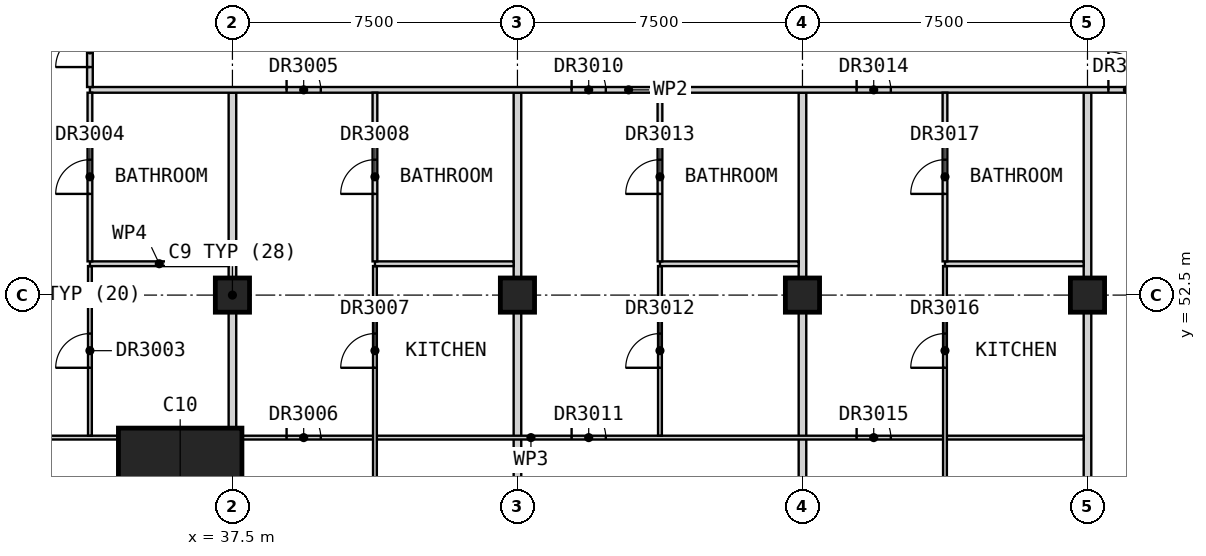
"""IFC4 building model, lengths in metres.
Left out: names, types, materials, properties, quantities, classifications, styles, units other than length and angle.
Written with IfcOpenShell. Run it as: python <this file> out.ifc"""

import sys

from ifc_helpers import new_model, si_unit, direction, frame, frame_2d, origin, origin_2d, place, context, subcontext, project, spatial, rectangle, extrude, element, fill, save


model = new_model("IFC4")
c1 = context("Model", 3, precision=1e-05, world=origin(), true_north=direction((0.0, 1.0)))
c2 = subcontext(c1, "Body", "Model", "MODEL_VIEW")
j1 = project(units=[si_unit("LENGTHUNIT", "METRE"), si_unit("PLANEANGLEUNIT", "RADIAN")], contexts=[c1])
p1 = place(None, origin())
s1 = spatial("IfcSite", under=j1, at=p1, CompositionType="ELEMENT")
p2 = place(p1, origin())
s2 = spatial("IfcBuilding", under=s1, at=p2, CompositionType="ELEMENT")
p3 = place(p2, frame((0.0, 0.0, 186.2)))
s3 = spatial("IfcBuildingStorey", under=s2, at=p3, CompositionType="ELEMENT", Elevation=186.2)
for number, where, z_axis, x_axis in (
    (1, (37.5, 52.5, 0.0), (0.0, 0.0, 1.0), (1.0, 0.0, 0.0)),
    (2, (45.0, 52.5, 0.0), (0.0, 0.0, 1.0), (1.0, 0.0, 0.0)),
    (3, (52.5, 52.5, 0.0), (0.0, 0.0, 1.0), (1.0, 0.0, 0.0)),
    (4, (60.0, 52.5, 0.0), (0.0, 0.0, 1.0), (1.0, 0.0, 0.0)),
):
    element("IfcColumn", number, at=place(p3, frame(where, z_axis=z_axis, x_axis=x_axis)), inside=s3, PredefinedType="COLUMN", context=c2, shape_type="SweptSolid", body=[
        extrude(rectangle(XDim=0.9, YDim=0.9, at=origin_2d()), origin(), (0.0, 0.0, 1.0), 3.5),
    ])
p4 = place(p3, frame((36.125, 47.375, 0.0), z_axis=(0.0, 0.0, 1.0), x_axis=(1.0, 0.0, 0.0)))
e5 = element("IfcColumn", 5, at=p4, inside=s3, PredefinedType="COLUMN", context=c2, shape_type="SweptSolid", body=[
    extrude(rectangle(XDim=3.25, YDim=3.25, at=origin_2d()), origin(), (0.0, 0.0, 1.0), 3.5),
])
p5 = place(p3, frame((37.5, 41.25, 0.0), z_axis=(0.0, 0.0, 1.0), x_axis=(0.0, 1.0, 0.0)))
e6 = element("IfcWall", 6, at=p5, inside=s3, PredefinedType="PARTITIONING", context=c2, shape_type="SweptSolid", body=[
    extrude(rectangle(XDim=16.575, YDim=0.2, at=frame_2d((8.288, 0.0))), origin(), (0.0, 0.0, 1.0), 2.75),
])
for number, where, z_axis, x_axis in (
    (7, (45.0, 41.25, 0.0), (0.0, 0.0, 1.0), (0.0, 1.0, 0.0)),
    (8, (52.5, 41.25, 0.0), (0.0, 0.0, 1.0), (0.0, 1.0, 0.0)),
    (9, (60.0, 41.25, 0.0), (0.0, 0.0, 1.0), (0.0, 1.0, 0.0)),
):
    element("IfcWall", number, at=place(p3, frame(where, z_axis=z_axis, x_axis=x_axis)), inside=s3, PredefinedType="PARTITIONING", context=c2, shape_type="SweptSolid", body=[
        extrude(rectangle(XDim=16.575, YDim=0.2, at=frame_2d((8.288, 0.0))), origin(), (0.0, 0.0, 1.0), 3.25),
    ])
p6 = place(p3, frame((33.75, 57.9, 0.0), z_axis=(0.0, 0.0, 1.0), x_axis=(1.0, 0.0, 0.0)))
e10 = element("IfcWall", 10, at=p6, inside=s3, PredefinedType="PARTITIONING", context=c2, shape_type="SweptSolid", body=[
    extrude(rectangle(XDim=28.35, YDim=0.15, at=frame_2d((14.175, 0.0))), origin(), (0.0, 0.0, 1.0), 3.25),
])
p7 = place(p6, frame((5.175, 0.0, 0.0)))
e11 = element("IfcOpeningElement", 11, at=p7, cuts=e10, PredefinedType="OPENING", context=c2, shape_type="SweptSolid", body=[
    extrude(rectangle(XDim=0.9, YDim=2.1, at=frame_2d((0.45, 1.05))), frame((0.0, 0.085, 0.0), z_axis=(0.0, -1.0, 0.0), x_axis=(1.0, 0.0, 0.0)), (0.0, 0.0, 1.0), 0.17),
])
p8 = place(p6, frame((12.675, 0.0, 0.0)))
e12 = element("IfcOpeningElement", 12, at=p8, cuts=e10, PredefinedType="OPENING", context=c2, shape_type="SweptSolid", body=[
    extrude(rectangle(XDim=0.9, YDim=2.1, at=frame_2d((0.45, 1.05))), frame((0.0, 0.085, 0.0), z_axis=(0.0, -1.0, 0.0), x_axis=(1.0, 0.0, 0.0)), (0.0, 0.0, 1.0), 0.17),
])
p9 = place(p6, frame((20.175, 0.0, 0.0)))
e13 = element("IfcOpeningElement", 13, at=p9, cuts=e10, PredefinedType="OPENING", context=c2, shape_type="SweptSolid", body=[
    extrude(rectangle(XDim=0.9, YDim=2.1, at=frame_2d((0.45, 1.05))), frame((0.0, 0.085, 0.0), z_axis=(0.0, -1.0, 0.0), x_axis=(1.0, 0.0, 0.0)), (0.0, 0.0, 1.0), 0.17),
])
p10 = place(p6, frame((26.8, 0.0, 0.0)))
e14 = element("IfcOpeningElement", 14, at=p10, cuts=e10, PredefinedType="OPENING", context=c2, shape_type="SweptSolid", body=[
    extrude(rectangle(XDim=1.0, YDim=2.1, at=frame_2d((0.5, 1.05))), frame((0.0, 0.085, 0.0), z_axis=(0.0, -1.0, 0.0), x_axis=(1.0, 0.0, 0.0)), (0.0, 0.0, 1.0), 0.17),
])
p11 = place(p3, frame((33.75, 57.975, 0.0), z_axis=(0.0, 0.0, 1.0), x_axis=(0.0, 1.0, 0.0)))
e15 = element("IfcWall", 15, at=p11, inside=s3, PredefinedType="PARTITIONING", context=c2, shape_type="SweptSolid", body=[
    extrude(rectangle(XDim=2.025, YDim=0.15, at=frame_2d((1.012, 0.0))), origin(), (0.0, 0.0, 1.0), 3.25),
])
p12 = place(p11, frame((0.525, 0.0, 0.0)))
e16 = element("IfcOpeningElement", 16, at=p12, cuts=e15, PredefinedType="OPENING", context=c2, shape_type="SweptSolid", body=[
    extrude(rectangle(XDim=0.9, YDim=2.1, at=frame_2d((0.45, 1.05))), frame((0.0, 0.085, 0.0), z_axis=(0.0, -1.0, 0.0), x_axis=(1.0, 0.0, 0.0)), (0.0, 0.0, 1.0), 0.17),
])
p13 = place(p3, frame((30.81, 48.75, 0.0), z_axis=(0.0, 0.0, 1.0), x_axis=(1.0, 0.0, 0.0)))
e17 = element("IfcWall", 17, at=p13, inside=s3, PredefinedType="PARTITIONING", context=c2, shape_type="SweptSolid", body=[
    extrude(rectangle(XDim=29.09, YDim=0.1, at=frame_2d((14.545, 0.0))), origin(), (0.0, 0.0, 1.0), 3.25),
])
p14 = place(p13, frame((0.615, 0.0, 0.0)))
e18 = element("IfcOpeningElement", 18, at=p14, cuts=e17, PredefinedType="OPENING", context=c2, shape_type="SweptSolid", body=[
    extrude(rectangle(XDim=0.9, YDim=2.1, at=frame_2d((0.45, 1.05))), frame((0.0, 0.06, 0.0), z_axis=(0.0, -1.0, 0.0), x_axis=(1.0, 0.0, 0.0)), (0.0, 0.0, 1.0), 0.12),
])
p15 = place(p13, frame((8.115, 0.0, 0.0)))
e19 = element("IfcOpeningElement", 19, at=p15, cuts=e17, PredefinedType="OPENING", context=c2, shape_type="SweptSolid", body=[
    extrude(rectangle(XDim=0.9, YDim=2.1, at=frame_2d((0.45, 1.05))), frame((0.0, 0.06, 0.0), z_axis=(0.0, -1.0, 0.0), x_axis=(1.0, 0.0, 0.0)), (0.0, 0.0, 1.0), 0.12),
])
p16 = place(p13, frame((15.615, 0.0, 0.0)))
e20 = element("IfcOpeningElement", 20, at=p16, cuts=e17, PredefinedType="OPENING", context=c2, shape_type="SweptSolid", body=[
    extrude(rectangle(XDim=0.9, YDim=2.1, at=frame_2d((0.45, 1.05))), frame((0.0, 0.06, 0.0), z_axis=(0.0, -1.0, 0.0), x_axis=(1.0, 0.0, 0.0)), (0.0, 0.0, 1.0), 0.12),
])
p17 = place(p13, frame((23.115, 0.0, 0.0)))
e21 = element("IfcOpeningElement", 21, at=p17, cuts=e17, PredefinedType="OPENING", context=c2, shape_type="SweptSolid", body=[
    extrude(rectangle(XDim=0.9, YDim=2.1, at=frame_2d((0.45, 1.05))), frame((0.0, 0.06, 0.0), z_axis=(0.0, -1.0, 0.0), x_axis=(1.0, 0.0, 0.0)), (0.0, 0.0, 1.0), 0.12),
])
p18 = place(p3, frame((33.75, 48.8, 0.0), z_axis=(0.0, 0.0, 1.0), x_axis=(0.0, 1.0, 0.0)))
e22 = element("IfcWall", 22, at=p18, inside=s3, PredefinedType="PARTITIONING", context=c2, shape_type="SweptSolid", body=[
    extrude(rectangle(XDim=4.462, YDim=0.1, at=frame_2d((2.231, 0.0))), origin(), (0.0, 0.0, 1.0), 3.25),
])
p19 = place(p18, frame((1.788, 0.0, 0.0)))
e23 = element("IfcOpeningElement", 23, at=p19, cuts=e22, PredefinedType="OPENING", context=c2, shape_type="SweptSolid", body=[
    extrude(rectangle(XDim=0.9, YDim=2.1, at=frame_2d((0.45, 1.05))), frame((0.0, 0.06, 0.0), z_axis=(0.0, -1.0, 0.0), x_axis=(1.0, 0.0, 0.0)), (0.0, 0.0, 1.0), 0.12),
])
p20 = place(p3, frame((41.25, 42.06, 0.0), z_axis=(0.0, 0.0, 1.0), x_axis=(0.0, 1.0, 0.0)))
e24 = element("IfcWall", 24, at=p20, inside=s3, PredefinedType="PARTITIONING", context=c2, shape_type="SweptSolid", body=[
    extrude(rectangle(XDim=11.202, YDim=0.1, at=frame_2d((5.601, 0.0))), origin(), (0.0, 0.0, 1.0), 3.25),
])
p21 = place(p20, frame((8.528, 0.0, 0.0)))
e25 = element("IfcOpeningElement", 25, at=p21, cuts=e24, PredefinedType="OPENING", context=c2, shape_type="SweptSolid", body=[
    extrude(rectangle(XDim=0.9, YDim=2.1, at=frame_2d((0.45, 1.05))), frame((0.0, 0.06, 0.0), z_axis=(0.0, -1.0, 0.0), x_axis=(1.0, 0.0, 0.0)), (0.0, 0.0, 1.0), 0.12),
])
p22 = place(p20, frame((2.49, 0.0, 0.0)))
e26 = element("IfcOpeningElement", 26, at=p22, cuts=e24, PredefinedType="OPENING", context=c2, shape_type="SweptSolid", body=[
    extrude(rectangle(XDim=0.9, YDim=2.1, at=frame_2d((0.45, 1.05))), frame((0.0, 0.06, 0.0), z_axis=(0.0, -1.0, 0.0), x_axis=(1.0, 0.0, 0.0)), (0.0, 0.0, 1.0), 0.12),
])
p23 = place(p3, frame((48.75, 48.8, 0.0), z_axis=(0.0, 0.0, 1.0), x_axis=(0.0, 1.0, 0.0)))
e27 = element("IfcWall", 27, at=p23, inside=s3, PredefinedType="PARTITIONING", context=c2, shape_type="SweptSolid", body=[
    extrude(rectangle(XDim=4.462, YDim=0.1, at=frame_2d((2.231, 0.0))), origin(), (0.0, 0.0, 1.0), 3.25),
])
p24 = place(p23, frame((1.788, 0.0, 0.0)))
e28 = element("IfcOpeningElement", 28, at=p24, cuts=e27, PredefinedType="OPENING", context=c2, shape_type="SweptSolid", body=[
    extrude(rectangle(XDim=0.9, YDim=2.1, at=frame_2d((0.45, 1.05))), frame((0.0, 0.06, 0.0), z_axis=(0.0, -1.0, 0.0), x_axis=(1.0, 0.0, 0.0)), (0.0, 0.0, 1.0), 0.12),
])
p25 = place(p3, frame((56.25, 42.06, 0.0), z_axis=(0.0, 0.0, 1.0), x_axis=(0.0, 1.0, 0.0)))
e29 = element("IfcWall", 29, at=p25, inside=s3, PredefinedType="PARTITIONING", context=c2, shape_type="SweptSolid", body=[
    extrude(rectangle(XDim=11.202, YDim=0.1, at=frame_2d((5.601, 0.0))), origin(), (0.0, 0.0, 1.0), 3.25),
])
p26 = place(p25, frame((8.528, 0.0, 0.0)))
e30 = element("IfcOpeningElement", 30, at=p26, cuts=e29, PredefinedType="OPENING", context=c2, shape_type="SweptSolid", body=[
    extrude(rectangle(XDim=0.9, YDim=2.1, at=frame_2d((0.45, 1.05))), frame((0.0, 0.06, 0.0), z_axis=(0.0, -1.0, 0.0), x_axis=(1.0, 0.0, 0.0)), (0.0, 0.0, 1.0), 0.12),
])
p27 = place(p25, frame((2.49, 0.0, 0.0)))
e31 = element("IfcOpeningElement", 31, at=p27, cuts=e29, PredefinedType="OPENING", context=c2, shape_type="SweptSolid", body=[
    extrude(rectangle(XDim=0.9, YDim=2.1, at=frame_2d((0.45, 1.05))), frame((0.0, 0.06, 0.0), z_axis=(0.0, -1.0, 0.0), x_axis=(1.0, 0.0, 0.0)), (0.0, 0.0, 1.0), 0.12),
])
for number, where, z_axis, x_axis in (
    (32, (33.75, 53.325, 0.0), (0.0, 0.0, 1.0), (1.0, 0.0, 0.0)),
    (33, (41.25, 53.325, 0.0), (0.0, 0.0, 1.0), (1.0, 0.0, 0.0)),
    (34, (48.75, 53.325, 0.0), (0.0, 0.0, 1.0), (1.0, 0.0, 0.0)),
    (35, (56.25, 53.325, 0.0), (0.0, 0.0, 1.0), (1.0, 0.0, 0.0)),
):
    element("IfcWall", number, at=place(p3, frame(where, z_axis=z_axis, x_axis=x_axis)), inside=s3, PredefinedType="PARTITIONING", context=c2, shape_type="SweptSolid", body=[
        extrude(rectangle(XDim=3.65, YDim=0.125, at=frame_2d((1.825, 0.0))), origin(), (0.0, 0.0, 1.0), 3.25),
    ])
p28 = place(p3, frame((33.75, 53.387, 0.0), z_axis=(0.0, 0.0, 1.0), x_axis=(0.0, 1.0, 0.0)))
e36 = element("IfcWall", 36, at=p28, inside=s3, PredefinedType="PARTITIONING", context=c2, shape_type="SweptSolid", body=[
    extrude(rectangle(XDim=4.438, YDim=0.125, at=frame_2d((2.219, 0.0))), origin(), (0.0, 0.0, 1.0), 3.25),
])
p29 = place(p28, frame((1.775, 0.0, 0.0)))
e37 = element("IfcOpeningElement", 37, at=p29, cuts=e36, PredefinedType="OPENING", context=c2, shape_type="SweptSolid", body=[
    extrude(rectangle(XDim=0.9, YDim=2.1, at=frame_2d((0.45, 1.05))), frame((0.0, 0.073, 0.0), z_axis=(0.0, -1.0, 0.0), x_axis=(1.0, 0.0, 0.0)), (0.0, 0.0, 1.0), 0.145),
])
p30 = place(p3, frame((41.25, 53.387, 0.0), z_axis=(0.0, 0.0, 1.0), x_axis=(0.0, 1.0, 0.0)))
e38 = element("IfcWall", 38, at=p30, inside=s3, PredefinedType="PARTITIONING", context=c2, shape_type="SweptSolid", body=[
    extrude(rectangle(XDim=4.438, YDim=0.125, at=frame_2d((2.219, 0.0))), origin(), (0.0, 0.0, 1.0), 3.25),
])
p31 = place(p30, frame((1.775, 0.0, 0.0)))
e39 = element("IfcOpeningElement", 39, at=p31, cuts=e38, PredefinedType="OPENING", context=c2, shape_type="SweptSolid", body=[
    extrude(rectangle(XDim=0.9, YDim=2.1, at=frame_2d((0.45, 1.05))), frame((0.0, 0.073, 0.0), z_axis=(0.0, -1.0, 0.0), x_axis=(1.0, 0.0, 0.0)), (0.0, 0.0, 1.0), 0.145),
])
p32 = place(p3, frame((48.75, 53.387, 0.0), z_axis=(0.0, 0.0, 1.0), x_axis=(0.0, 1.0, 0.0)))
e40 = element("IfcWall", 40, at=p32, inside=s3, PredefinedType="PARTITIONING", context=c2, shape_type="SweptSolid", body=[
    extrude(rectangle(XDim=4.438, YDim=0.125, at=frame_2d((2.219, 0.0))), origin(), (0.0, 0.0, 1.0), 3.25),
])
p33 = place(p32, frame((1.775, 0.0, 0.0)))
e41 = element("IfcOpeningElement", 41, at=p33, cuts=e40, PredefinedType="OPENING", context=c2, shape_type="SweptSolid", body=[
    extrude(rectangle(XDim=0.9, YDim=2.1, at=frame_2d((0.45, 1.05))), frame((0.0, 0.073, 0.0), z_axis=(0.0, -1.0, 0.0), x_axis=(1.0, 0.0, 0.0)), (0.0, 0.0, 1.0), 0.145),
])
p34 = place(p3, frame((56.25, 53.387, 0.0), z_axis=(0.0, 0.0, 1.0), x_axis=(0.0, 1.0, 0.0)))
e42 = element("IfcWall", 42, at=p34, inside=s3, PredefinedType="PARTITIONING", context=c2, shape_type="SweptSolid", body=[
    extrude(rectangle(XDim=4.438, YDim=0.125, at=frame_2d((2.219, 0.0))), origin(), (0.0, 0.0, 1.0), 3.25),
])
p35 = place(p34, frame((1.775, 0.0, 0.0)))
e43 = element("IfcOpeningElement", 43, at=p35, cuts=e42, PredefinedType="OPENING", context=c2, shape_type="SweptSolid", body=[
    extrude(rectangle(XDim=0.9, YDim=2.1, at=frame_2d((0.45, 1.05))), frame((0.0, 0.073, 0.0), z_axis=(0.0, -1.0, 0.0), x_axis=(1.0, 0.0, 0.0)), (0.0, 0.0, 1.0), 0.145),
])
p36 = place(p12, origin())
e44 = element("IfcDoor", 44, at=p36, inside=s3, OperationType="SINGLE_SWING_LEFT", PredefinedType="DOOR", context=c2, shape_type="SweptSolid", body=[
    extrude(rectangle(XDim=0.9, YDim=2.1, at=frame_2d((0.45, 1.05))), frame((0.0, 0.025, 0.0), z_axis=(0.0, -1.0, 0.0), x_axis=(1.0, 0.0, 0.0)), (0.0, 0.0, 1.0), 0.05),
])
fill(e16, e44)
p37 = place(p19, origin())
e45 = element("IfcDoor", 45, at=p37, inside=s3, OperationType="SINGLE_SWING_RIGHT", PredefinedType="DOOR", context=c2, shape_type="SweptSolid", body=[
    extrude(rectangle(XDim=0.9, YDim=2.1, at=frame_2d((0.45, 1.05))), frame((0.0, 0.025, 0.0), z_axis=(0.0, -1.0, 0.0), x_axis=(1.0, 0.0, 0.0)), (0.0, 0.0, 1.0), 0.05),
])
fill(e23, e45)
p38 = place(p29, origin())
e46 = element("IfcDoor", 46, at=p38, inside=s3, OperationType="SINGLE_SWING_RIGHT", PredefinedType="DOOR", context=c2, shape_type="SweptSolid", body=[
    extrude(rectangle(XDim=0.9, YDim=2.1, at=frame_2d((0.45, 1.05))), frame((0.0, 0.025, 0.0), z_axis=(0.0, -1.0, 0.0), x_axis=(1.0, 0.0, 0.0)), (0.0, 0.0, 1.0), 0.05),
])
fill(e37, e46)
p39 = place(p7, origin())
e47 = element("IfcDoor", 47, at=p39, inside=s3, OperationType="SINGLE_SWING_RIGHT", PredefinedType="DOOR", context=c2, shape_type="SweptSolid", body=[
    extrude(rectangle(XDim=0.9, YDim=2.1, at=frame_2d((0.45, 1.05))), frame((0.0, 0.025, 0.0), z_axis=(0.0, -1.0, 0.0), x_axis=(1.0, 0.0, 0.0)), (0.0, 0.0, 1.0), 0.05),
])
fill(e11, e47)
p40 = place(p15, origin())
e48 = element("IfcDoor", 48, at=p40, inside=s3, OperationType="SINGLE_SWING_LEFT", PredefinedType="DOOR", context=c2, shape_type="SweptSolid", body=[
    extrude(rectangle(XDim=0.9, YDim=2.1, at=frame_2d((0.45, 1.05))), frame((0.0, 0.025, 0.0), z_axis=(0.0, -1.0, 0.0), x_axis=(1.0, 0.0, 0.0)), (0.0, 0.0, 1.0), 0.05),
])
fill(e19, e48)
p41 = place(p21, origin())
e49 = element("IfcDoor", 49, at=p41, inside=s3, OperationType="SINGLE_SWING_RIGHT", PredefinedType="DOOR", context=c2, shape_type="SweptSolid", body=[
    extrude(rectangle(XDim=0.9, YDim=2.1, at=frame_2d((0.45, 1.05))), frame((0.0, 0.025, 0.0), z_axis=(0.0, -1.0, 0.0), x_axis=(1.0, 0.0, 0.0)), (0.0, 0.0, 1.0), 0.05),
])
fill(e25, e49)
p42 = place(p31, origin())
e50 = element("IfcDoor", 50, at=p42, inside=s3, OperationType="SINGLE_SWING_RIGHT", PredefinedType="DOOR", context=c2, shape_type="SweptSolid", body=[
    extrude(rectangle(XDim=0.9, YDim=2.1, at=frame_2d((0.45, 1.05))), frame((0.0, 0.025, 0.0), z_axis=(0.0, -1.0, 0.0), x_axis=(1.0, 0.0, 0.0)), (0.0, 0.0, 1.0), 0.05),
])
fill(e39, e50)
p43 = place(p8, origin())
e51 = element("IfcDoor", 51, at=p43, inside=s3, OperationType="SINGLE_SWING_RIGHT", PredefinedType="DOOR", context=c2, shape_type="SweptSolid", body=[
    extrude(rectangle(XDim=0.9, YDim=2.1, at=frame_2d((0.45, 1.05))), frame((0.0, 0.025, 0.0), z_axis=(0.0, -1.0, 0.0), x_axis=(1.0, 0.0, 0.0)), (0.0, 0.0, 1.0), 0.05),
])
fill(e12, e51)
p44 = place(p16, origin())
e52 = element("IfcDoor", 52, at=p44, inside=s3, OperationType="SINGLE_SWING_LEFT", PredefinedType="DOOR", context=c2, shape_type="SweptSolid", body=[
    extrude(rectangle(XDim=0.9, YDim=2.1, at=frame_2d((0.45, 1.05))), frame((0.0, 0.025, 0.0), z_axis=(0.0, -1.0, 0.0), x_axis=(1.0, 0.0, 0.0)), (0.0, 0.0, 1.0), 0.05),
])
fill(e20, e52)
p45 = place(p24, origin())
e53 = element("IfcDoor", 53, at=p45, inside=s3, OperationType="SINGLE_SWING_RIGHT", PredefinedType="DOOR", context=c2, shape_type="SweptSolid", body=[
    extrude(rectangle(XDim=0.9, YDim=2.1, at=frame_2d((0.45, 1.05))), frame((0.0, 0.025, 0.0), z_axis=(0.0, -1.0, 0.0), x_axis=(1.0, 0.0, 0.0)), (0.0, 0.0, 1.0), 0.05),
])
fill(e28, e53)
p46 = place(p33, origin())
e54 = element("IfcDoor", 54, at=p46, inside=s3, OperationType="SINGLE_SWING_RIGHT", PredefinedType="DOOR", context=c2, shape_type="SweptSolid", body=[
    extrude(rectangle(XDim=0.9, YDim=2.1, at=frame_2d((0.45, 1.05))), frame((0.0, 0.025, 0.0), z_axis=(0.0, -1.0, 0.0), x_axis=(1.0, 0.0, 0.0)), (0.0, 0.0, 1.0), 0.05),
])
fill(e41, e54)
p47 = place(p9, origin())
e55 = element("IfcDoor", 55, at=p47, inside=s3, OperationType="SINGLE_SWING_RIGHT", PredefinedType="DOOR", context=c2, shape_type="SweptSolid", body=[
    extrude(rectangle(XDim=0.9, YDim=2.1, at=frame_2d((0.45, 1.05))), frame((0.0, 0.025, 0.0), z_axis=(0.0, -1.0, 0.0), x_axis=(1.0, 0.0, 0.0)), (0.0, 0.0, 1.0), 0.05),
])
fill(e13, e55)
p48 = place(p17, origin())
e56 = element("IfcDoor", 56, at=p48, inside=s3, OperationType="SINGLE_SWING_LEFT", PredefinedType="DOOR", context=c2, shape_type="SweptSolid", body=[
    extrude(rectangle(XDim=0.9, YDim=2.1, at=frame_2d((0.45, 1.05))), frame((0.0, 0.025, 0.0), z_axis=(0.0, -1.0, 0.0), x_axis=(1.0, 0.0, 0.0)), (0.0, 0.0, 1.0), 0.05),
])
fill(e21, e56)
p49 = place(p26, origin())
e57 = element("IfcDoor", 57, at=p49, inside=s3, OperationType="SINGLE_SWING_RIGHT", PredefinedType="DOOR", context=c2, shape_type="SweptSolid", body=[
    extrude(rectangle(XDim=0.9, YDim=2.1, at=frame_2d((0.45, 1.05))), frame((0.0, 0.025, 0.0), z_axis=(0.0, -1.0, 0.0), x_axis=(1.0, 0.0, 0.0)), (0.0, 0.0, 1.0), 0.05),
])
fill(e30, e57)
p50 = place(p35, origin())
e58 = element("IfcDoor", 58, at=p50, inside=s3, OperationType="SINGLE_SWING_RIGHT", PredefinedType="DOOR", context=c2, shape_type="SweptSolid", body=[
    extrude(rectangle(XDim=0.9, YDim=2.1, at=frame_2d((0.45, 1.05))), frame((0.0, 0.025, 0.0), z_axis=(0.0, -1.0, 0.0), x_axis=(1.0, 0.0, 0.0)), (0.0, 0.0, 1.0), 0.05),
])
fill(e43, e58)
p51 = place(p10, origin())
e59 = element("IfcDoor", 59, at=p51, inside=s3, OperationType="SINGLE_SWING_RIGHT", PredefinedType="DOOR", context=c2, shape_type="SweptSolid", body=[
    extrude(rectangle(XDim=1.0, YDim=2.1, at=frame_2d((0.5, 1.05))), frame((0.0, 0.025, 0.0), z_axis=(0.0, -1.0, 0.0), x_axis=(1.0, 0.0, 0.0)), (0.0, 0.0, 1.0), 0.05),
])
fill(e14, e59)
save(model, sys.argv[1])
